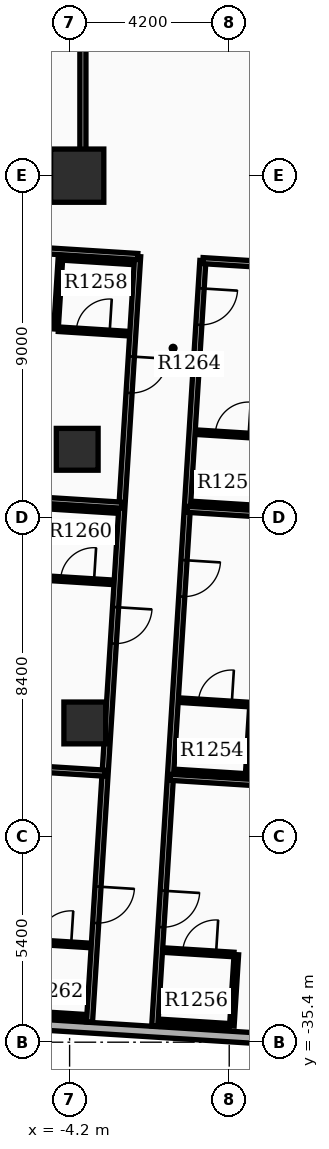
"""IFC4 building model, lengths in metres.
Left out: names, types, materials, properties, quantities, classifications, styles, units other than length and angle.
Written with IfcOpenShell. Run it as: python <this file> out.ifc"""

import sys

from ifc_helpers import new_model, si_unit, direction, frame, frame_2d, origin, origin_2d, place, context, subcontext, project, spatial, rectangle, extrude, element, fill, save


model = new_model("IFC4")
c1 = context("Model", 3, precision=1e-05, world=origin(), true_north=direction((0.0, 1.0)))
c2 = subcontext(c1, "Body", "Model", "MODEL_VIEW")
j1 = project(units=[si_unit("LENGTHUNIT", "METRE"), si_unit("PLANEANGLEUNIT", "RADIAN")], contexts=[c1])
p1 = place(None, origin())
s1 = spatial("IfcSite", under=j1, at=p1, CompositionType="ELEMENT")
p2 = place(p1, origin())
s2 = spatial("IfcBuilding", under=s1, at=p2, CompositionType="ELEMENT")
p3 = place(p2, frame((0.0, 0.0, 79.5)))
s3 = spatial("IfcBuildingStorey", under=s2, at=p3, CompositionType="ELEMENT", Elevation=79.5)
p4 = place(p3, frame((-4.0, -12.6, 0.0), z_axis=(0.0, 0.0, 1.0), x_axis=(1.0, 0.0, 0.0)))
e1 = element("IfcColumn", 1, at=p4, inside=s3, PredefinedType="COLUMN", context=c2, shape_type="SweptSolid", body=[
    extrude(rectangle(XDim=1.4, YDim=1.4, at=origin_2d()), origin(), (0.0, 0.0, 1.0), 3.9),
])
for number, where, z_axis, x_axis in (
    (2, (-4.0, -19.8, 0.0), (0.0, 0.0, 1.0), (1.0, 0.0, 0.0)),
    (3, (-3.8, -27.0, 0.0), (0.0, 0.0, 1.0), (1.0, 0.0, 0.0)),
):
    element("IfcColumn", number, at=place(p3, frame(where, z_axis=z_axis, x_axis=x_axis)), inside=s3, PredefinedType="COLUMN", context=c2, shape_type="SweptSolid", body=[
        extrude(rectangle(XDim=1.1, YDim=1.1, at=origin_2d()), origin(), (0.0, 0.0, 1.0), 3.9),
    ])
p5 = place(p3, frame((-9.055, -34.68, 0.0), z_axis=(0.0, 0.0, 1.0), x_axis=(0.998026318072, -0.062797041623, 0.0)))
e4 = element("IfcWall", 4, at=p5, inside=s3, PredefinedType="STANDARD", context=c2, shape_type="SweptSolid", body=[
    extrude(rectangle(XDim=13.72, YDim=0.28, at=frame_2d((6.86, 0.0))), origin(), (0.0, 0.0, 1.0), 2.91),
])
p6 = place(p5, frame((0.85, 0.0, 0.85)))
e5 = element("IfcOpeningElement", 5, at=p6, cuts=e4, PredefinedType="OPENING", context=c2, shape_type="SweptSolid", body=[
    extrude(rectangle(XDim=1.0, YDim=1.5, at=frame_2d((0.5, 0.75))), frame((0.0, 0.15, 0.0), z_axis=(0.0, -1.0, 0.0), x_axis=(1.0, 0.0, 0.0)), (0.0, 0.0, 1.0), 0.3),
])
p7 = place(p3, frame((-12.4, -13.15, 0.0), z_axis=(0.0, 0.0, 1.0), x_axis=(1.0, 0.0, 0.0)))
e6 = element("IfcWall", 6, at=p7, inside=s3, PredefinedType="PARTITIONING", context=c2, shape_type="SweptSolid", body=[
    extrude(rectangle(XDim=8.55, YDim=0.16, at=frame_2d((4.275, 0.0))), origin(), (0.0, 0.0, 1.0), 2.9),
])
p8 = place(p3, frame((-3.85, -13.065, 0.0), z_axis=(0.0, 0.0, 1.0), x_axis=(0.0, 1.0, 0.0)))
e7 = element("IfcWall", 7, at=p8, inside=s3, PredefinedType="PARTITIONING", context=c2, shape_type="SweptSolid", body=[
    extrude(rectangle(XDim=3.93, YDim=0.16, at=frame_2d((1.965, 0.0))), origin(), (0.0, 0.0, 1.0), 2.9),
])
p9 = place(p3, frame((-0.693, -14.836, 0.0), z_axis=(0.0, 0.0, 1.0), x_axis=(-0.062795509413, -0.998026414479, 0.0)))
e8 = element("IfcWall", 8, at=p9, inside=s3, PredefinedType="PARTITIONING", context=c2, shape_type="SweptSolid", body=[
    extrude(rectangle(XDim=20.182, YDim=0.16, at=frame_2d((10.091, 0.0))), origin(), (0.0, 0.0, 1.0), 2.9),
])
p10 = place(p9, frame((0.731, 0.0, 0.0)))
e9 = element("IfcOpeningElement", 9, at=p10, cuts=e8, PredefinedType="OPENING", context=c2, shape_type="SweptSolid", body=[
    extrude(rectangle(XDim=0.96, YDim=2.15, at=frame_2d((0.48, 1.075))), frame((0.0, 0.09, 0.0), z_axis=(0.0, -1.0, 0.0), x_axis=(1.0, 0.0, 0.0)), (0.0, 0.0, 1.0), 0.18),
])
p11 = place(p9, frame((7.896, 0.0, 0.0)))
e10 = element("IfcOpeningElement", 10, at=p11, cuts=e8, PredefinedType="OPENING", context=c2, shape_type="SweptSolid", body=[
    extrude(rectangle(XDim=0.96, YDim=2.15, at=frame_2d((0.48, 1.075))), frame((0.0, 0.09, 0.0), z_axis=(0.0, -1.0, 0.0), x_axis=(1.0, 0.0, 0.0)), (0.0, 0.0, 1.0), 0.18),
])
p12 = place(p9, frame((16.611, 0.0, 0.0)))
e11 = element("IfcOpeningElement", 11, at=p12, cuts=e8, PredefinedType="OPENING", context=c2, shape_type="SweptSolid", body=[
    extrude(rectangle(XDim=0.96, YDim=2.15, at=frame_2d((0.48, 1.075))), frame((0.0, 0.09, 0.0), z_axis=(0.0, -1.0, 0.0), x_axis=(1.0, 0.0, 0.0)), (0.0, 0.0, 1.0), 0.18),
])
p13 = place(p3, frame((-0.693, -14.836, 0.0), z_axis=(0.0, 0.0, 1.0), x_axis=(0.998025806434, -0.062805172492, 0.0)))
e12 = element("IfcWall", 12, at=p13, inside=s3, PredefinedType="PARTITIONING", context=c2, shape_type="SweptSolid", body=[
    extrude(rectangle(XDim=6.48, YDim=0.16, at=frame_2d((3.24, 0.0))), origin(), (0.0, 0.0, 1.0), 2.9),
])
p14 = place(p3, frame((-1.104, -21.379, 0.0), z_axis=(0.0, 0.0, 1.0), x_axis=(0.998027895917, -0.062771960074, 0.0)))
e13 = element("IfcWall", 13, at=p14, inside=s3, PredefinedType="PARTITIONING", context=c2, shape_type="SweptSolid", body=[
    extrude(rectangle(XDim=6.332, YDim=0.16, at=frame_2d((3.166, 0.0))), origin(), (0.0, 0.0, 1.0), 2.9),
])
p15 = place(p3, frame((-0.837, -19.352, 0.0), z_axis=(0.0, 0.0, 1.0), x_axis=(0.998027972529, -0.062770741989, 0.0)))
e14 = element("IfcWall", 14, at=p15, inside=s3, PredefinedType="PARTITIONING", context=c2, shape_type="SweptSolid", body=[
    extrude(rectangle(XDim=1.82, YDim=0.12, at=frame_2d((0.91, 0.0))), origin(), (0.0, 0.0, 1.0), 2.9),
])
p16 = place(p15, frame((0.47, 0.0, 0.0)))
e15 = element("IfcOpeningElement", 15, at=p16, cuts=e14, PredefinedType="OPENING", context=c2, shape_type="SweptSolid", body=[
    extrude(rectangle(XDim=0.88, YDim=2.1, at=frame_2d((0.44, 1.05))), frame((0.0, 0.07, 0.0), z_axis=(0.0, -1.0, 0.0), x_axis=(1.0, 0.0, 0.0)), (0.0, 0.0, 1.0), 0.14),
])
p17 = place(p3, frame((-0.955, -21.228, 0.0), z_axis=(0.0, 0.0, 1.0), x_axis=(0.998019030272, -0.062912758763, 0.0)))
e16 = element("IfcWall", 16, at=p17, inside=s3, PredefinedType="PARTITIONING", context=c2, shape_type="SweptSolid", body=[
    extrude(rectangle(XDim=1.82, YDim=0.12, at=frame_2d((0.91, 0.0))), origin(), (0.0, 0.0, 1.0), 2.9),
])
p18 = place(p3, frame((-1.548, -28.43, 0.0), z_axis=(0.0, 0.0, 1.0), x_axis=(0.998027895917, -0.062771960074, 0.0)))
e17 = element("IfcWall", 17, at=p18, inside=s3, PredefinedType="PARTITIONING", context=c2, shape_type="SweptSolid", body=[
    extrude(rectangle(XDim=6.332, YDim=0.16, at=frame_2d((3.166, 0.0))), origin(), (0.0, 0.0, 1.0), 2.9),
])
p19 = place(p3, frame((-1.281, -26.403, 0.0), z_axis=(0.0, 0.0, 1.0), x_axis=(0.998019030272, -0.062912758763, 0.0)))
e18 = element("IfcWall", 18, at=p19, inside=s3, PredefinedType="PARTITIONING", context=c2, shape_type="SweptSolid", body=[
    extrude(rectangle(XDim=1.82, YDim=0.12, at=frame_2d((0.91, 0.0))), origin(), (0.0, 0.0, 1.0), 2.9),
])
p20 = place(p19, frame((0.47, 0.0, 0.0)))
e19 = element("IfcOpeningElement", 19, at=p20, cuts=e18, PredefinedType="OPENING", context=c2, shape_type="SweptSolid", body=[
    extrude(rectangle(XDim=0.88, YDim=2.1, at=frame_2d((0.44, 1.05))), frame((0.0, 0.07, 0.0), z_axis=(0.0, -1.0, 0.0), x_axis=(1.0, 0.0, 0.0)), (0.0, 0.0, 1.0), 0.14),
])
p21 = place(p3, frame((-1.398, -28.279, 0.0), z_axis=(0.0, 0.0, 1.0), x_axis=(0.998027443946, -0.062779145668, 0.0)))
e20 = element("IfcWall", 20, at=p21, inside=s3, PredefinedType="PARTITIONING", context=c2, shape_type="SweptSolid", body=[
    extrude(rectangle(XDim=1.82, YDim=0.12, at=frame_2d((0.91, 0.0))), origin(), (0.0, 0.0, 1.0), 2.9),
])
p22 = place(p3, frame((0.601, -26.521, 0.0), z_axis=(0.0, 0.0, 1.0), x_axis=(-0.062717813936, -0.998031300018, 0.0)))
e21 = element("IfcWall", 21, at=p22, inside=s3, PredefinedType="PARTITIONING", context=c2, shape_type="SweptSolid", body=[
    extrude(rectangle(XDim=1.88, YDim=0.12, at=frame_2d((0.94, 0.0))), origin(), (0.0, 0.0, 1.0), 2.9),
])
p23 = place(p3, frame((-1.694, -32.979, 0.0), z_axis=(0.0, 0.0, 1.0), x_axis=(0.998027443946, -0.062779145668, 0.0)))
e22 = element("IfcWall", 22, at=p23, inside=s3, PredefinedType="PARTITIONING", context=c2, shape_type="SweptSolid", body=[
    extrude(rectangle(XDim=1.82, YDim=0.12, at=frame_2d((0.91, 0.0))), origin(), (0.0, 0.0, 1.0), 2.9),
])
p24 = place(p23, frame((0.47, 0.0, 0.0)))
e23 = element("IfcOpeningElement", 23, at=p24, cuts=e22, PredefinedType="OPENING", context=c2, shape_type="SweptSolid", body=[
    extrude(rectangle(XDim=0.88, YDim=2.1, at=frame_2d((0.44, 1.05))), frame((0.0, 0.07, 0.0), z_axis=(0.0, -1.0, 0.0), x_axis=(1.0, 0.0, 0.0)), (0.0, 0.0, 1.0), 0.14),
])
p25 = place(p3, frame((-1.812, -34.855, 0.0), z_axis=(0.0, 0.0, 1.0), x_axis=(0.998027443946, -0.062779145668, 0.0)))
e24 = element("IfcWall", 24, at=p25, inside=s3, PredefinedType="PARTITIONING", context=c2, shape_type="SweptSolid", body=[
    extrude(rectangle(XDim=1.82, YDim=0.12, at=frame_2d((0.91, 0.0))), origin(), (0.0, 0.0, 1.0), 2.9),
])
p26 = place(p3, frame((0.187, -33.097, 0.0), z_axis=(0.0, 0.0, 1.0), x_axis=(-0.062855297722, -0.998022650819, 0.0)))
e25 = element("IfcWall", 25, at=p26, inside=s3, PredefinedType="PARTITIONING", context=c2, shape_type="SweptSolid", body=[
    extrude(rectangle(XDim=1.88, YDim=0.12, at=frame_2d((0.94, 0.0))), origin(), (0.0, 0.0, 1.0), 2.9),
])
p27 = place(p3, frame((-2.409, -14.728, 0.0), z_axis=(0.0, 0.0, 1.0), x_axis=(-0.062795509413, -0.998026414479, 0.0)))
e26 = element("IfcWall", 26, at=p27, inside=s3, PredefinedType="PARTITIONING", context=c2, shape_type="SweptSolid", body=[
    extrude(rectangle(XDim=20.182, YDim=0.16, at=frame_2d((10.091, 0.0))), origin(), (0.0, 0.0, 1.0), 2.9),
])
p28 = place(p27, frame((2.636, 0.0, 0.0)))
e27 = element("IfcOpeningElement", 27, at=p28, cuts=e26, PredefinedType="OPENING", context=c2, shape_type="SweptSolid", body=[
    extrude(rectangle(XDim=0.96, YDim=2.15, at=frame_2d((0.48, 1.075))), frame((0.0, 0.09, 0.0), z_axis=(0.0, -1.0, 0.0), x_axis=(1.0, 0.0, 0.0)), (0.0, 0.0, 1.0), 0.18),
])
p29 = place(p27, frame((9.243, 0.0, 0.0)))
e28 = element("IfcOpeningElement", 28, at=p29, cuts=e26, PredefinedType="OPENING", context=c2, shape_type="SweptSolid", body=[
    extrude(rectangle(XDim=0.96, YDim=2.15, at=frame_2d((0.48, 1.075))), frame((0.0, 0.09, 0.0), z_axis=(0.0, -1.0, 0.0), x_axis=(1.0, 0.0, 0.0)), (0.0, 0.0, 1.0), 0.18),
])
p30 = place(p27, frame((16.611, 0.0, 0.0)))
e29 = element("IfcOpeningElement", 29, at=p30, cuts=e26, PredefinedType="OPENING", context=c2, shape_type="SweptSolid", body=[
    extrude(rectangle(XDim=0.96, YDim=2.15, at=frame_2d((0.48, 1.075))), frame((0.0, 0.09, 0.0), z_axis=(0.0, -1.0, 0.0), x_axis=(1.0, 0.0, 0.0)), (0.0, 0.0, 1.0), 0.18),
])
p31 = place(p3, frame((-2.409, -14.728, 0.0), z_axis=(0.0, 0.0, 1.0), x_axis=(-0.998025838074, 0.062804669704, 0.0)))
e30 = element("IfcWall", 30, at=p31, inside=s3, PredefinedType="PARTITIONING", context=c2, shape_type="SweptSolid", body=[
    extrude(rectangle(XDim=5.24, YDim=0.16, at=frame_2d((2.62, 0.0))), origin(), (0.0, 0.0, 1.0), 2.9),
])
p32 = place(p3, frame((-2.821, -21.271, 0.0), z_axis=(0.0, 0.0, 1.0), x_axis=(-0.998028437135, 0.062763354514, 0.0)))
e31 = element("IfcWall", 31, at=p32, inside=s3, PredefinedType="PARTITIONING", context=c2, shape_type="SweptSolid", body=[
    extrude(rectangle(XDim=5.092, YDim=0.16, at=frame_2d((2.546, 0.0))), origin(), (0.0, 0.0, 1.0), 2.9),
])
p33 = place(p3, frame((-4.494, -16.641, 0.0), z_axis=(0.0, 0.0, 1.0), x_axis=(0.998027443946, -0.062779145668, 0.0)))
e32 = element("IfcWall", 32, at=p33, inside=s3, PredefinedType="PARTITIONING", context=c2, shape_type="SweptSolid", body=[
    extrude(rectangle(XDim=1.82, YDim=0.12, at=frame_2d((0.91, 0.0))), origin(), (0.0, 0.0, 1.0), 2.9),
])
p34 = place(p33, frame((0.47, 0.0, 0.0)))
e33 = element("IfcOpeningElement", 33, at=p34, cuts=e32, PredefinedType="OPENING", context=c2, shape_type="SweptSolid", body=[
    extrude(rectangle(XDim=0.88, YDim=2.1, at=frame_2d((0.44, 1.05))), frame((0.0, 0.07, 0.0), z_axis=(0.0, -1.0, 0.0), x_axis=(1.0, 0.0, 0.0)), (0.0, 0.0, 1.0), 0.14),
])
p35 = place(p3, frame((-4.376, -14.764, 0.0), z_axis=(0.0, 0.0, 1.0), x_axis=(0.998027443946, -0.062779145668, 0.0)))
e34 = element("IfcWall", 34, at=p35, inside=s3, PredefinedType="PARTITIONING", context=c2, shape_type="SweptSolid", body=[
    extrude(rectangle(XDim=1.82, YDim=0.12, at=frame_2d((0.91, 0.0))), origin(), (0.0, 0.0, 1.0), 2.9),
])
p36 = place(p3, frame((-4.441, -14.76, 0.0), z_axis=(0.0, 0.0, 1.0), x_axis=(-0.062717813936, -0.998031300018, 0.0)))
e35 = element("IfcWall", 35, at=p36, inside=s3, PredefinedType="PARTITIONING", context=c2, shape_type="SweptSolid", body=[
    extrude(rectangle(XDim=1.88, YDim=0.12, at=frame_2d((0.94, 0.0))), origin(), (0.0, 0.0, 1.0), 2.9),
])
p37 = place(p3, frame((-3.265, -28.322, 0.0), z_axis=(0.0, 0.0, 1.0), x_axis=(-0.998025432585, 0.06281111298, 0.0)))
e36 = element("IfcWall", 36, at=p37, inside=s3, PredefinedType="PARTITIONING", context=c2, shape_type="SweptSolid", body=[
    extrude(rectangle(XDim=5.092, YDim=0.16, at=frame_2d((2.546, 0.0))), origin(), (0.0, 0.0, 1.0), 2.9),
])
p38 = place(p3, frame((-4.906, -23.184, 0.0), z_axis=(0.0, 0.0, 1.0), x_axis=(0.998019030272, -0.062912758763, 0.0)))
e37 = element("IfcWall", 37, at=p38, inside=s3, PredefinedType="PARTITIONING", context=c2, shape_type="SweptSolid", body=[
    extrude(rectangle(XDim=1.82, YDim=0.12, at=frame_2d((0.91, 0.0))), origin(), (0.0, 0.0, 1.0), 2.9),
])
p39 = place(p38, frame((0.47, 0.0, 0.0)))
e38 = element("IfcOpeningElement", 38, at=p39, cuts=e37, PredefinedType="OPENING", context=c2, shape_type="SweptSolid", body=[
    extrude(rectangle(XDim=0.88, YDim=2.1, at=frame_2d((0.44, 1.05))), frame((0.0, 0.07, 0.0), z_axis=(0.0, -1.0, 0.0), x_axis=(1.0, 0.0, 0.0)), (0.0, 0.0, 1.0), 0.14),
])
p40 = place(p3, frame((-4.787, -21.307, 0.0), z_axis=(0.0, 0.0, 1.0), x_axis=(0.998027443946, -0.062779145668, 0.0)))
e39 = element("IfcWall", 39, at=p40, inside=s3, PredefinedType="PARTITIONING", context=c2, shape_type="SweptSolid", body=[
    extrude(rectangle(XDim=1.82, YDim=0.12, at=frame_2d((0.91, 0.0))), origin(), (0.0, 0.0, 1.0), 2.9),
])
p41 = place(p3, frame((-5.507, -32.739, 0.0), z_axis=(0.0, 0.0, 1.0), x_axis=(0.998027443946, -0.062779145668, 0.0)))
e40 = element("IfcWall", 40, at=p41, inside=s3, PredefinedType="PARTITIONING", context=c2, shape_type="SweptSolid", body=[
    extrude(rectangle(XDim=1.82, YDim=0.12, at=frame_2d((0.91, 0.0))), origin(), (0.0, 0.0, 1.0), 2.9),
])
p42 = place(p41, frame((0.47, 0.0, 0.0)))
e41 = element("IfcOpeningElement", 41, at=p42, cuts=e40, PredefinedType="OPENING", context=c2, shape_type="SweptSolid", body=[
    extrude(rectangle(XDim=0.88, YDim=2.1, at=frame_2d((0.44, 1.05))), frame((0.0, 0.07, 0.0), z_axis=(0.0, -1.0, 0.0), x_axis=(1.0, 0.0, 0.0)), (0.0, 0.0, 1.0), 0.14),
])
p43 = place(p3, frame((-5.625, -34.615, 0.0), z_axis=(0.0, 0.0, 1.0), x_axis=(0.998019030272, -0.062912758763, 0.0)))
e42 = element("IfcWall", 42, at=p43, inside=s3, PredefinedType="PARTITIONING", context=c2, shape_type="SweptSolid", body=[
    extrude(rectangle(XDim=1.82, YDim=0.12, at=frame_2d((0.91, 0.0))), origin(), (0.0, 0.0, 1.0), 2.9),
])
p44 = place(p10, origin())
e43 = element("IfcDoor", 43, at=p44, inside=s3, OperationType="SINGLE_SWING_LEFT", PredefinedType="DOOR", context=c2, shape_type="SweptSolid", body=[
    extrude(rectangle(XDim=0.96, YDim=2.15, at=frame_2d((0.48, 1.075))), frame((0.0, 0.025, 0.0), z_axis=(0.0, -1.0, 0.0), x_axis=(1.0, 0.0, 0.0)), (0.0, 0.0, 1.0), 0.05),
])
fill(e9, e43)
p45 = place(p16, origin())
e44 = element("IfcDoor", 44, at=p45, inside=s3, OperationType="SINGLE_SWING_RIGHT", PredefinedType="DOOR", context=c2, shape_type="SweptSolid", body=[
    extrude(rectangle(XDim=0.88, YDim=2.1, at=frame_2d((0.44, 1.05))), frame((0.0, 0.025, 0.0), z_axis=(0.0, -1.0, 0.0), x_axis=(1.0, 0.0, 0.0)), (0.0, 0.0, 1.0), 0.05),
])
fill(e15, e44)
p46 = place(p11, origin())
e45 = element("IfcDoor", 45, at=p46, inside=s3, OperationType="SINGLE_SWING_LEFT", PredefinedType="DOOR", context=c2, shape_type="SweptSolid", body=[
    extrude(rectangle(XDim=0.96, YDim=2.15, at=frame_2d((0.48, 1.075))), frame((0.0, 0.025, 0.0), z_axis=(0.0, -1.0, 0.0), x_axis=(1.0, 0.0, 0.0)), (0.0, 0.0, 1.0), 0.05),
])
fill(e10, e45)
p47 = place(p20, origin())
e46 = element("IfcDoor", 46, at=p47, inside=s3, OperationType="SINGLE_SWING_RIGHT", PredefinedType="DOOR", context=c2, shape_type="SweptSolid", body=[
    extrude(rectangle(XDim=0.88, YDim=2.1, at=frame_2d((0.44, 1.05))), frame((0.0, 0.025, 0.0), z_axis=(0.0, -1.0, 0.0), x_axis=(1.0, 0.0, 0.0)), (0.0, 0.0, 1.0), 0.05),
])
fill(e19, e46)
p48 = place(p12, origin())
e47 = element("IfcDoor", 47, at=p48, inside=s3, OperationType="SINGLE_SWING_LEFT", PredefinedType="DOOR", context=c2, shape_type="SweptSolid", body=[
    extrude(rectangle(XDim=0.96, YDim=2.15, at=frame_2d((0.48, 1.075))), frame((0.0, 0.025, 0.0), z_axis=(0.0, -1.0, 0.0), x_axis=(1.0, 0.0, 0.0)), (0.0, 0.0, 1.0), 0.05),
])
fill(e11, e47)
p49 = place(p24, origin())
e48 = element("IfcDoor", 48, at=p49, inside=s3, OperationType="SINGLE_SWING_RIGHT", PredefinedType="DOOR", context=c2, shape_type="SweptSolid", body=[
    extrude(rectangle(XDim=0.88, YDim=2.1, at=frame_2d((0.44, 1.05))), frame((0.0, 0.025, 0.0), z_axis=(0.0, -1.0, 0.0), x_axis=(1.0, 0.0, 0.0)), (0.0, 0.0, 1.0), 0.05),
])
fill(e23, e48)
p50 = place(p28, origin())
e49 = element("IfcDoor", 49, at=p50, inside=s3, OperationType="SINGLE_SWING_LEFT", PredefinedType="DOOR", context=c2, shape_type="SweptSolid", body=[
    extrude(rectangle(XDim=0.96, YDim=2.15, at=frame_2d((0.48, 1.075))), frame((0.0, 0.025, 0.0), z_axis=(0.0, -1.0, 0.0), x_axis=(1.0, 0.0, 0.0)), (0.0, 0.0, 1.0), 0.05),
])
fill(e27, e49)
p51 = place(p34, origin())
e50 = element("IfcDoor", 50, at=p51, inside=s3, OperationType="SINGLE_SWING_RIGHT", PredefinedType="DOOR", context=c2, shape_type="SweptSolid", body=[
    extrude(rectangle(XDim=0.88, YDim=2.1, at=frame_2d((0.44, 1.05))), frame((0.0, 0.025, 0.0), z_axis=(0.0, -1.0, 0.0), x_axis=(1.0, 0.0, 0.0)), (0.0, 0.0, 1.0), 0.05),
])
fill(e33, e50)
p52 = place(p29, origin())
e51 = element("IfcDoor", 51, at=p52, inside=s3, OperationType="SINGLE_SWING_LEFT", PredefinedType="DOOR", context=c2, shape_type="SweptSolid", body=[
    extrude(rectangle(XDim=0.96, YDim=2.15, at=frame_2d((0.48, 1.075))), frame((0.0, 0.025, 0.0), z_axis=(0.0, -1.0, 0.0), x_axis=(1.0, 0.0, 0.0)), (0.0, 0.0, 1.0), 0.05),
])
fill(e28, e51)
p53 = place(p39, origin())
e52 = element("IfcDoor", 52, at=p53, inside=s3, OperationType="SINGLE_SWING_RIGHT", PredefinedType="DOOR", context=c2, shape_type="SweptSolid", body=[
    extrude(rectangle(XDim=0.88, YDim=2.1, at=frame_2d((0.44, 1.05))), frame((0.0, 0.025, 0.0), z_axis=(0.0, -1.0, 0.0), x_axis=(1.0, 0.0, 0.0)), (0.0, 0.0, 1.0), 0.05),
])
fill(e38, e52)
p54 = place(p30, origin())
e53 = element("IfcDoor", 53, at=p54, inside=s3, OperationType="SINGLE_SWING_LEFT", PredefinedType="DOOR", context=c2, shape_type="SweptSolid", body=[
    extrude(rectangle(XDim=0.96, YDim=2.15, at=frame_2d((0.48, 1.075))), frame((0.0, 0.025, 0.0), z_axis=(0.0, -1.0, 0.0), x_axis=(1.0, 0.0, 0.0)), (0.0, 0.0, 1.0), 0.05),
])
fill(e29, e53)
p55 = place(p42, origin())
e54 = element("IfcDoor", 54, at=p55, inside=s3, OperationType="SINGLE_SWING_RIGHT", PredefinedType="DOOR", context=c2, shape_type="SweptSolid", body=[
    extrude(rectangle(XDim=0.88, YDim=2.1, at=frame_2d((0.44, 1.05))), frame((0.0, 0.025, 0.0), z_axis=(0.0, -1.0, 0.0), x_axis=(1.0, 0.0, 0.0)), (0.0, 0.0, 1.0), 0.05),
])
fill(e41, e54)
save(model, sys.argv[1])
